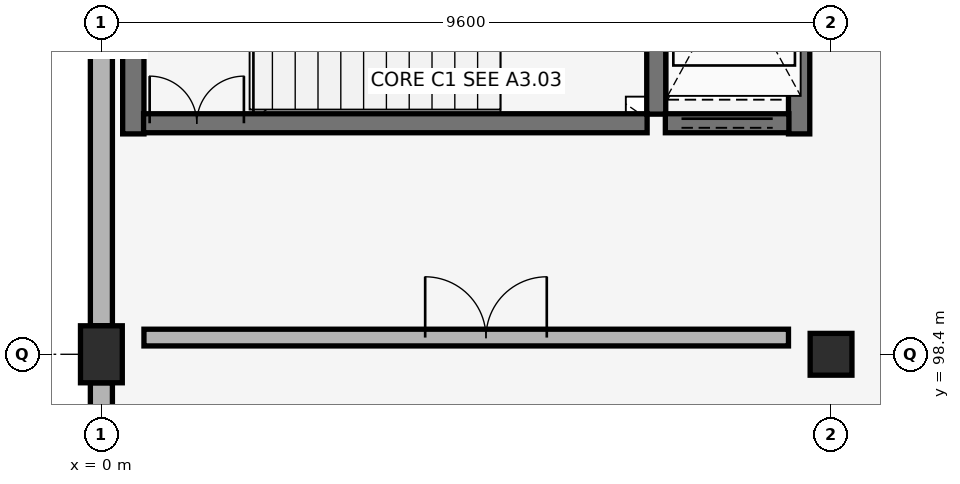
"""IFC4 building model, lengths in metres.
Left out: names, types, materials, properties, quantities, classifications, styles, units other than length and angle.
Written with IfcOpenShell. Run it as: python <this file> out.ifc"""

import sys

from ifc_helpers import new_model, si_unit, direction, frame, frame_2d, origin, origin_2d, place, context, subcontext, project, spatial, rectangle, extrude, element, fill, save


model = new_model("IFC4")
c1 = context("Model", 3, precision=1e-05, world=origin(), true_north=direction((0.0, 1.0)))
c2 = subcontext(c1, "Body", "Model", "MODEL_VIEW")
j1 = project(units=[si_unit("LENGTHUNIT", "METRE"), si_unit("PLANEANGLEUNIT", "RADIAN")], contexts=[c1])
p1 = place(None, origin())
s1 = spatial("IfcSite", under=j1, at=p1, CompositionType="ELEMENT")
p2 = place(p1, origin())
s2 = spatial("IfcBuilding", under=s1, at=p2, CompositionType="ELEMENT")
p3 = place(p2, frame((0.0, 0.0, 16.66)))
s3 = spatial("IfcBuildingStorey", under=s2, at=p3, CompositionType="ELEMENT", Elevation=16.66)
p4 = place(p3, frame((0.0, 98.4, 0.0), z_axis=(0.0, 0.0, 1.0), x_axis=(1.0, 0.0, 0.0)))
e1 = element("IfcColumn", 1, at=p4, inside=s3, PredefinedType="COLUMN", context=c2, shape_type="SweptSolid", body=[
    extrude(rectangle(XDim=0.55, YDim=0.75, at=origin_2d()), origin(), (0.0, 0.0, 1.0), 4.08),
])
p5 = place(p3, frame((9.6, 98.4, 0.0), z_axis=(0.0, 0.0, 1.0), x_axis=(1.0, 0.0, 0.0)))
e2 = element("IfcColumn", 2, at=p5, inside=s3, PredefinedType="COLUMN", context=c2, shape_type="SweptSolid", body=[
    extrude(rectangle(XDim=0.55, YDim=0.55, at=origin_2d()), origin(), (0.0, 0.0, 1.0), 4.08),
])
p6 = place(p3, frame((0.0, 98.025, 0.0), z_axis=(0.0, 0.0, 1.0), x_axis=(0.0, -1.0, 0.0)))
e3 = element("IfcWall", 3, at=p6, inside=s3, PredefinedType="SOLIDWALL", context=c2, shape_type="SweptSolid", body=[
    extrude(rectangle(XDim=6.45, YDim=0.29, at=frame_2d((3.225, 0.0))), origin(), (0.0, 0.0, 1.0), 3.08),
])
p7 = place(p6, frame((1.103, 0.0, 0.88)))
e4 = element("IfcOpeningElement", 4, at=p7, cuts=e3, PredefinedType="OPENING", context=c2, shape_type="SweptSolid", body=[
    extrude(rectangle(XDim=1.02, YDim=1.88, at=frame_2d((0.51, 0.94))), frame((0.0, 0.155, 0.0), z_axis=(0.0, -1.0, 0.0), x_axis=(1.0, 0.0, 0.0)), (0.0, 0.0, 1.0), 0.31),
])
p8 = place(p6, frame((2.715, 0.0, 0.88)))
e5 = element("IfcOpeningElement", 5, at=p8, cuts=e3, PredefinedType="OPENING", context=c2, shape_type="SweptSolid", body=[
    extrude(rectangle(XDim=1.02, YDim=1.88, at=frame_2d((0.51, 0.94))), frame((0.0, 0.155, 0.0), z_axis=(0.0, -1.0, 0.0), x_axis=(1.0, 0.0, 0.0)), (0.0, 0.0, 1.0), 0.31),
])
p9 = place(p6, frame((4.327, 0.0, 0.88)))
e6 = element("IfcOpeningElement", 6, at=p9, cuts=e3, PredefinedType="OPENING", context=c2, shape_type="SweptSolid", body=[
    extrude(rectangle(XDim=1.02, YDim=1.88, at=frame_2d((0.51, 0.94))), frame((0.0, 0.155, 0.0), z_axis=(0.0, -1.0, 0.0), x_axis=(1.0, 0.0, 0.0)), (0.0, 0.0, 1.0), 0.31),
])
p10 = place(p3, frame((0.0, 105.225, 0.0), z_axis=(0.0, 0.0, 1.0), x_axis=(0.0, -1.0, 0.0)))
e7 = element("IfcWall", 7, at=p10, inside=s3, PredefinedType="SOLIDWALL", context=c2, shape_type="SweptSolid", body=[
    extrude(rectangle(XDim=6.45, YDim=0.29, at=frame_2d((3.225, 0.0))), origin(), (0.0, 0.0, 1.0), 3.08),
])
for number, where, z_axis, x_axis in (
    (8, (0.42, 101.3, 0.0), (0.0, 0.0, 1.0), (0.0, 1.0, 0.0)),
    (9, (9.18, 101.3, 0.0), (0.0, 0.0, 1.0), (0.0, 1.0, 0.0)),
):
    element("IfcWall", number, at=place(p3, frame(where, z_axis=z_axis, x_axis=x_axis)), inside=s3, PredefinedType="SHEAR", context=c2, shape_type="SweptSolid", body=[
        extrude(rectangle(XDim=4.08, YDim=0.28, at=frame_2d((2.04, 0.0))), origin(), (0.0, 0.0, 1.0), 3.8),
    ])
p11 = place(p3, frame((7.3, 101.56, 0.0), z_axis=(0.0, 0.0, 1.0), x_axis=(0.0, 1.0, 0.0)))
e10 = element("IfcWall", 10, at=p11, inside=s3, PredefinedType="SHEAR", context=c2, shape_type="SweptSolid", body=[
    extrude(rectangle(XDim=3.54, YDim=0.25, at=frame_2d((1.77, 0.0))), origin(), (0.0, 0.0, 1.0), 3.8),
])
p12 = place(p3, frame((0.555, 101.44, 0.0), z_axis=(0.0, 0.0, 1.0), x_axis=(1.0, 0.0, 0.0)))
e11 = element("IfcWall", 11, at=p12, inside=s3, PredefinedType="SHEAR", context=c2, shape_type="SweptSolid", body=[
    extrude(rectangle(XDim=6.625, YDim=0.25, at=frame_2d((3.312, 0.0))), origin(), (0.0, 0.0, 1.0), 3.8),
])
p13 = place(p12, frame((0.08, 0.0, 0.0)))
e12 = element("IfcOpeningElement", 12, at=p13, cuts=e11, PredefinedType="OPENING", context=c2, shape_type="SweptSolid", body=[
    extrude(rectangle(XDim=1.24, YDim=2.15, at=frame_2d((0.62, 1.075))), frame((0.0, 0.135, 0.0), z_axis=(0.0, -1.0, 0.0), x_axis=(1.0, 0.0, 0.0)), (0.0, 0.0, 1.0), 0.27),
])
p14 = place(p3, frame((0.56, 98.62, 0.0), z_axis=(0.0, 0.0, 1.0), x_axis=(1.0, 0.0, 0.0)))
e13 = element("IfcWall", 13, at=p14, inside=s3, PredefinedType="PARTITIONING", context=c2, shape_type="SweptSolid", body=[
    extrude(rectangle(XDim=8.48, YDim=0.22, at=frame_2d((4.24, 0.0))), origin(), (0.0, 0.0, 1.0), 3.13),
])
p15 = place(p14, frame((3.7, 0.0, 0.0)))
e14 = element("IfcOpeningElement", 14, at=p15, cuts=e13, PredefinedType="OPENING", context=c2, shape_type="SweptSolid", body=[
    extrude(rectangle(XDim=1.6, YDim=2.2, at=frame_2d((0.8, 1.1))), frame((0.0, 0.12, 0.0), z_axis=(0.0, -1.0, 0.0), x_axis=(1.0, 0.0, 0.0)), (0.0, 0.0, 1.0), 0.24),
])
p16 = place(p3, frame((7.42, 101.44, 0.0), z_axis=(0.0, 0.0, 1.0), x_axis=(1.0, 0.0, 0.0)))
e15 = element("IfcWall", 15, at=p16, inside=s3, PredefinedType="SHEAR", context=c2, shape_type="SweptSolid", body=[
    extrude(rectangle(XDim=1.625, YDim=0.25, at=frame_2d((0.812, 0.0))), origin(), (0.0, 0.0, 1.0), 3.8),
])
p17 = place(p16, frame((0.212, 0.0, 0.0)))
e16 = element("IfcOpeningElement", 16, at=p17, cuts=e15, PredefinedType="OPENING", context=c2, shape_type="SweptSolid", body=[
    extrude(rectangle(XDim=1.2, YDim=2.15, at=frame_2d((0.6, 1.075))), frame((0.0, 0.135, 0.0), z_axis=(0.0, -1.0, 0.0), x_axis=(1.0, 0.0, 0.0)), (0.0, 0.0, 1.0), 0.27),
])
p18 = place(p13, origin())
e17 = element("IfcDoor", 17, at=p18, inside=s3, OperationType="DOUBLE_DOOR_SINGLE_SWING", PredefinedType="DOOR", context=c2, shape_type="SweptSolid", body=[
    extrude(rectangle(XDim=1.24, YDim=2.15, at=frame_2d((0.62, 1.075))), frame((0.0, 0.025, 0.0), z_axis=(0.0, -1.0, 0.0), x_axis=(1.0, 0.0, 0.0)), (0.0, 0.0, 1.0), 0.05),
])
fill(e12, e17)
p19 = place(p15, origin())
e18 = element("IfcDoor", 18, at=p19, inside=s3, OperationType="DOUBLE_DOOR_SINGLE_SWING", PredefinedType="DOOR", context=c2, shape_type="SweptSolid", body=[
    extrude(rectangle(XDim=1.6, YDim=2.2, at=frame_2d((0.8, 1.1))), frame((0.0, 0.025, 0.0), z_axis=(0.0, -1.0, 0.0), x_axis=(1.0, 0.0, 0.0)), (0.0, 0.0, 1.0), 0.05),
])
fill(e14, e18)
p20 = place(p17, origin())
e19 = element("IfcDoor", 19, at=p20, inside=s3, OperationType="DOUBLE_DOOR_SLIDING", PredefinedType="DOOR", context=c2, shape_type="SweptSolid", body=[
    extrude(rectangle(XDim=1.2, YDim=2.15, at=frame_2d((0.6, 1.075))), frame((0.0, 0.025, 0.0), z_axis=(0.0, -1.0, 0.0), x_axis=(1.0, 0.0, 0.0)), (0.0, 0.0, 1.0), 0.05),
])
fill(e16, e19)
save(model, sys.argv[1])
